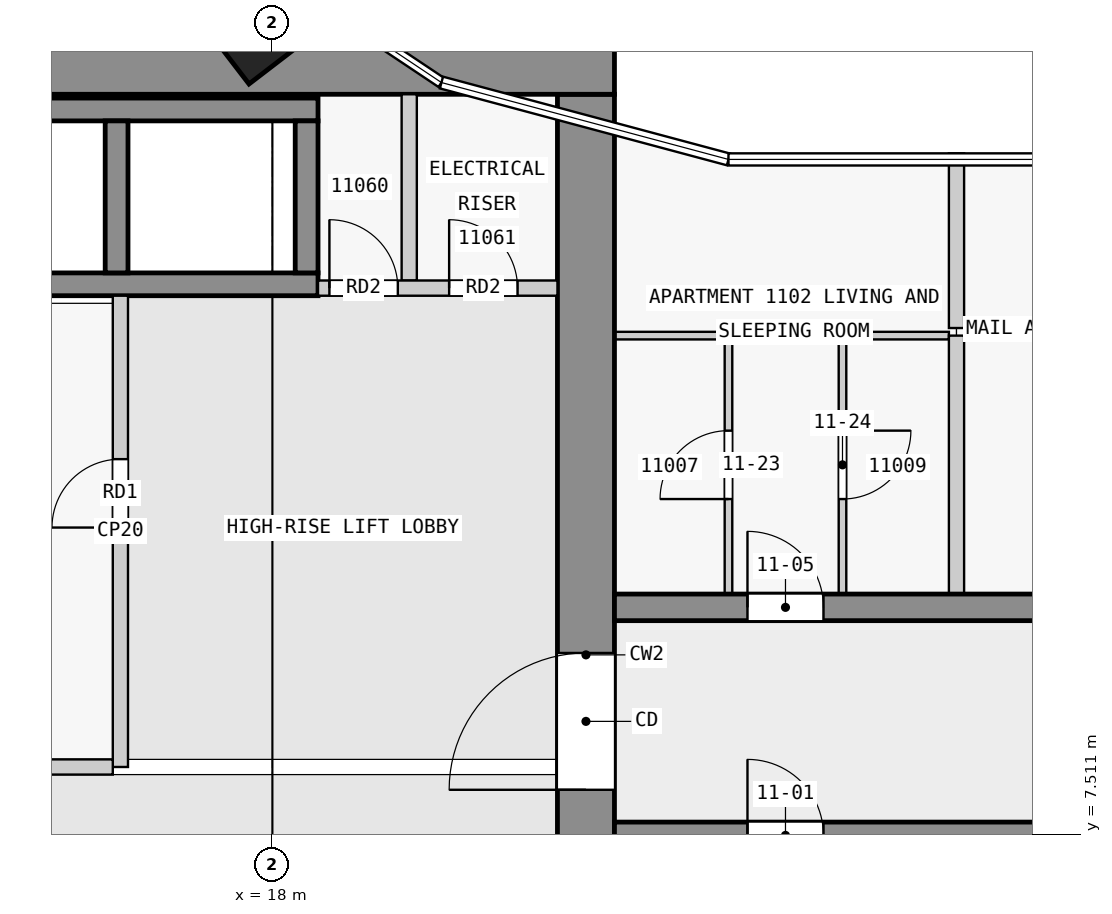
"""IFC4 building model, lengths in metres.
Left out: names, types, materials, properties, quantities, classifications, styles, units other than length and angle.
Written with IfcOpenShell. Run it as: python <this file> out.ifc"""

import sys

from ifc_helpers import new_model, si_unit, direction, frame, frame_2d, origin, origin_2d, place, context, subcontext, project, spatial, rectangle, extrude, element, fill, save


model = new_model("IFC4")
c1 = context("Model", 3, precision=1e-05, world=origin(), true_north=direction((0.0, 1.0)))
c2 = subcontext(c1, "Body", "Model", "MODEL_VIEW")
j1 = project(units=[si_unit("LENGTHUNIT", "METRE"), si_unit("PLANEANGLEUNIT", "RADIAN")], contexts=[c1])
p1 = place(None, origin())
s1 = spatial("IfcSite", under=j1, at=p1, CompositionType="ELEMENT")
p2 = place(p1, origin())
s2 = spatial("IfcBuilding", under=s1, at=p2, CompositionType="ELEMENT")
p3 = place(p2, frame((0.0, 0.0, 47.8)))
s3 = spatial("IfcBuildingStorey", under=s2, at=p3, CompositionType="ELEMENT", Elevation=47.8)
p4 = place(p3, frame((18.065, 18.05, 0.0), z_axis=(0.0, 0.0, 1.0), x_axis=(-0.608810846443, 0.793315418515, 0.0)))
e1 = element("IfcColumn", 1, at=p4, inside=s3, PredefinedType="COLUMN", context=c2, shape_type="SweptSolid", body=[
    extrude(rectangle(XDim=0.6, YDim=1.4, at=origin_2d()), origin(), (0.0, 0.0, 1.0), 3.5),
])
p5 = place(p3, frame((1.55, 17.625, 0.0), z_axis=(0.0, 0.0, 1.0), x_axis=(1.0, 0.0, 0.0)))
e2 = element("IfcWall", 2, at=p5, inside=s3, PredefinedType="SHEAR", context=c2, shape_type="SweptSolid", body=[
    extrude(rectangle(XDim=20.95, YDim=0.75, at=frame_2d((10.475, 0.0))), origin(), (0.0, 0.0, 1.0), 3.25),
])
p6 = place(p5, frame((6.55, 0.0, 0.0)))
e3 = element("IfcOpeningElement", 3, at=p6, cuts=e2, PredefinedType="OPENING", context=c2, shape_type="SweptSolid", body=[
    extrude(rectangle(XDim=1.8, YDim=2.1, at=frame_2d((0.9, 1.05))), frame((0.0, 0.385, 0.0), z_axis=(0.0, -1.0, 0.0), x_axis=(1.0, 0.0, 0.0)), (0.0, 0.0, 1.0), 0.77),
])
p7 = place(p3, frame((22.125, 2.5, 0.0), z_axis=(0.0, 0.0, 1.0), x_axis=(0.0, 1.0, 0.0)))
e4 = element("IfcWall", 4, at=p7, inside=s3, PredefinedType="SHEAR", context=c2, shape_type="SweptSolid", body=[
    extrude(rectangle(XDim=14.75, YDim=0.75, at=frame_2d((7.375, 0.0))), origin(), (0.0, 0.0, 1.0), 3.25),
])
p8 = place(p7, frame((5.6, 0.0, 0.0)))
e5 = element("IfcOpeningElement", 5, at=p8, cuts=e4, PredefinedType="OPENING", context=c2, shape_type="SweptSolid", body=[
    extrude(rectangle(XDim=1.8, YDim=2.1, at=frame_2d((0.9, 1.05))), frame((0.0, 0.385, 0.0), z_axis=(0.0, -1.0, 0.0), x_axis=(1.0, 0.0, 0.0)), (0.0, 0.0, 1.0), 0.77),
])
for number, where, z_axis, x_axis in (
    (6, (10.8, 17.05, 0.0), (0.0, 0.0, 1.0), (1.0, 0.0, 0.0)),
    (7, (10.8, 14.75, 0.0), (0.0, 0.0, 1.0), (1.0, 0.0, 0.0)),
):
    element("IfcWall", number, at=place(p3, frame(where, z_axis=z_axis, x_axis=x_axis)), inside=s3, PredefinedType="SHEAR", context=c2, shape_type="SweptSolid", body=[
        extrude(rectangle(XDim=7.8, YDim=0.3, at=frame_2d((3.9, 0.0))), origin(), (0.0, 0.0, 1.0), 3.25),
    ])
for number, where, z_axis, x_axis in (
    (8, (15.95, 14.9, 0.0), (0.0, 0.0, 1.0), (0.0, 1.0, 0.0)),
    (9, (18.45, 14.9, 0.0), (0.0, 0.0, 1.0), (0.0, 1.0, 0.0)),
):
    element("IfcWall", number, at=place(p3, frame(where, z_axis=z_axis, x_axis=x_axis)), inside=s3, PredefinedType="SHEAR", context=c2, shape_type="SweptSolid", body=[
        extrude(rectangle(XDim=2.0, YDim=0.3, at=frame_2d((1.0, 0.0))), origin(), (0.0, 0.0, 1.0), 3.25),
    ])
p9 = place(p3, frame((22.5, 7.5, 0.0), z_axis=(0.0, 0.0, 1.0), x_axis=(1.0, 0.0, 0.0)))
e10 = element("IfcWall", 10, at=p9, inside=s3, PredefinedType="SHEAR", context=c2, shape_type="SweptSolid", body=[
    extrude(rectangle(XDim=22.5, YDim=0.35, at=frame_2d((11.25, 0.0))), origin(), (0.0, 0.0, 1.0), 3.25),
])
p10 = place(p9, frame((1.75, 0.0, 0.0)))
e11 = element("IfcOpeningElement", 11, at=p10, cuts=e10, PredefinedType="OPENING", context=c2, shape_type="SweptSolid", body=[
    extrude(rectangle(XDim=1.0, YDim=2.1, at=frame_2d((0.5, 1.05))), frame((0.0, 0.185, 0.0), z_axis=(0.0, -1.0, 0.0), x_axis=(1.0, 0.0, 0.0)), (0.0, 0.0, 1.0), 0.37),
])
p11 = place(p9, frame((10.15, 0.0, 0.0)))
e12 = element("IfcOpeningElement", 12, at=p11, cuts=e10, PredefinedType="OPENING", context=c2, shape_type="SweptSolid", body=[
    extrude(rectangle(XDim=1.0, YDim=2.1, at=frame_2d((0.5, 1.05))), frame((0.0, 0.185, 0.0), z_axis=(0.0, -1.0, 0.0), x_axis=(1.0, 0.0, 0.0)), (0.0, 0.0, 1.0), 0.37),
])
p12 = place(p9, frame((18.75, 0.0, 0.0)))
e13 = element("IfcOpeningElement", 13, at=p12, cuts=e10, PredefinedType="OPENING", context=c2, shape_type="SweptSolid", body=[
    extrude(rectangle(XDim=0.9, YDim=2.1, at=frame_2d((0.45, 1.05))), frame((0.0, 0.185, 0.0), z_axis=(0.0, -1.0, 0.0), x_axis=(1.0, 0.0, 0.0)), (0.0, 0.0, 1.0), 0.37),
])
p13 = place(p9, frame((20.95, 0.0, 0.0)))
e14 = element("IfcOpeningElement", 14, at=p13, cuts=e10, PredefinedType="OPENING", context=c2, shape_type="SweptSolid", body=[
    extrude(rectangle(XDim=1.0, YDim=2.1, at=frame_2d((0.5, 1.05))), frame((0.0, 0.185, 0.0), z_axis=(0.0, -1.0, 0.0), x_axis=(1.0, 0.0, 0.0)), (0.0, 0.0, 1.0), 0.37),
])
p14 = place(p3, frame((22.5, 10.5, 0.0), z_axis=(0.0, 0.0, 1.0), x_axis=(1.0, 0.0, 0.0)))
e15 = element("IfcWall", 15, at=p14, inside=s3, PredefinedType="SHEAR", context=c2, shape_type="SweptSolid", body=[
    extrude(rectangle(XDim=22.5, YDim=0.35, at=frame_2d((11.25, 0.0))), origin(), (0.0, 0.0, 1.0), 3.25),
])
p15 = place(p14, frame((1.75, 0.0, 0.0)))
e16 = element("IfcOpeningElement", 16, at=p15, cuts=e15, PredefinedType="OPENING", context=c2, shape_type="SweptSolid", body=[
    extrude(rectangle(XDim=1.0, YDim=2.1, at=frame_2d((0.5, 1.05))), frame((0.0, 0.185, 0.0), z_axis=(0.0, -1.0, 0.0), x_axis=(1.0, 0.0, 0.0)), (0.0, 0.0, 1.0), 0.37),
])
p16 = place(p14, frame((6.25, 0.0, 0.0)))
e17 = element("IfcOpeningElement", 17, at=p16, cuts=e15, PredefinedType="OPENING", context=c2, shape_type="SweptSolid", body=[
    extrude(rectangle(XDim=1.0, YDim=2.1, at=frame_2d((0.5, 1.05))), frame((0.0, 0.185, 0.0), z_axis=(0.0, -1.0, 0.0), x_axis=(1.0, 0.0, 0.0)), (0.0, 0.0, 1.0), 0.37),
])
p17 = place(p14, frame((10.75, 0.0, 0.0)))
e18 = element("IfcOpeningElement", 18, at=p17, cuts=e15, PredefinedType="OPENING", context=c2, shape_type="SweptSolid", body=[
    extrude(rectangle(XDim=1.0, YDim=2.1, at=frame_2d((0.5, 1.05))), frame((0.0, 0.185, 0.0), z_axis=(0.0, -1.0, 0.0), x_axis=(1.0, 0.0, 0.0)), (0.0, 0.0, 1.0), 0.37),
])
p18 = place(p14, frame((16.85, 0.0, 0.0)))
e19 = element("IfcOpeningElement", 19, at=p18, cuts=e15, PredefinedType="OPENING", context=c2, shape_type="SweptSolid", body=[
    extrude(rectangle(XDim=1.0, YDim=2.1, at=frame_2d((0.5, 1.05))), frame((0.0, 0.185, 0.0), z_axis=(0.0, -1.0, 0.0), x_axis=(1.0, 0.0, 0.0)), (0.0, 0.0, 1.0), 0.37),
])
p19 = place(p3, frame((10.9, 8.4, 0.0), z_axis=(0.0, 0.0, 1.0), x_axis=(1.0, 0.0, 0.0)))
e20 = element("IfcWall", 20, at=p19, inside=s3, PredefinedType="PARTITIONING", context=c2, shape_type="SweptSolid", body=[
    extrude(rectangle(XDim=5.0, YDim=0.2, at=frame_2d((2.5, 0.0))), origin(), (0.0, 0.0, 1.0), 3.25),
])
p20 = place(p3, frame((16.0, 8.4, 0.0), z_axis=(0.0, 0.0, 1.0), x_axis=(0.0, 1.0, 0.0)))
e21 = element("IfcWall", 21, at=p20, inside=s3, PredefinedType="PARTITIONING", context=c2, shape_type="SweptSolid", body=[
    extrude(rectangle(XDim=6.2, YDim=0.2, at=frame_2d((3.1, 0.0))), origin(), (0.0, 0.0, 1.0), 3.25),
])
p21 = place(p20, frame((3.15, 0.0, 0.0)))
e22 = element("IfcOpeningElement", 22, at=p21, cuts=e21, PredefinedType="OPENING", context=c2, shape_type="SweptSolid", body=[
    extrude(rectangle(XDim=0.9, YDim=2.1, at=frame_2d((0.45, 1.05))), frame((0.0, 0.11, 0.0), z_axis=(0.0, -1.0, 0.0), x_axis=(1.0, 0.0, 0.0)), (0.0, 0.0, 1.0), 0.22),
])
p22 = place(p3, frame((18.6, 14.7, 0.0), z_axis=(0.0, 0.0, 1.0), x_axis=(1.0, 0.0, 0.0)))
e23 = element("IfcWall", 23, at=p22, inside=s3, PredefinedType="PARTITIONING", context=c2, shape_type="SweptSolid", body=[
    extrude(rectangle(XDim=3.15, YDim=0.2, at=frame_2d((1.575, 0.0))), origin(), (0.0, 0.0, 1.0), 3.25),
])
p23 = place(p22, frame((0.15, 0.0, 0.0)))
e24 = element("IfcOpeningElement", 24, at=p23, cuts=e23, PredefinedType="OPENING", context=c2, shape_type="SweptSolid", body=[
    extrude(rectangle(XDim=0.9, YDim=2.1, at=frame_2d((0.45, 1.05))), frame((0.0, 0.11, 0.0), z_axis=(0.0, -1.0, 0.0), x_axis=(1.0, 0.0, 0.0)), (0.0, 0.0, 1.0), 0.22),
])
p24 = place(p22, frame((1.725, 0.0, 0.0)))
e25 = element("IfcOpeningElement", 25, at=p24, cuts=e23, PredefinedType="OPENING", context=c2, shape_type="SweptSolid", body=[
    extrude(rectangle(XDim=0.9, YDim=2.1, at=frame_2d((0.45, 1.05))), frame((0.0, 0.11, 0.0), z_axis=(0.0, -1.0, 0.0), x_axis=(1.0, 0.0, 0.0)), (0.0, 0.0, 1.0), 0.22),
])
p25 = place(p3, frame((19.8, 14.8, 0.0), z_axis=(0.0, 0.0, 1.0), x_axis=(0.0, 1.0, 0.0)))
e26 = element("IfcWall", 26, at=p25, inside=s3, PredefinedType="PARTITIONING", context=c2, shape_type="SweptSolid", body=[
    extrude(rectangle(XDim=2.45, YDim=0.2, at=frame_2d((1.225, 0.0))), origin(), (0.0, 0.0, 1.0), 3.25),
])
p26 = place(p3, frame((23.95, 14.075, 0.0), z_axis=(0.0, 0.0, 1.0), x_axis=(-1.0, 0.0, 0.0)))
e27 = element("IfcWall", 27, at=p26, inside=s3, PredefinedType="PARTITIONING", context=c2, shape_type="SweptSolid", body=[
    extrude(rectangle(XDim=1.45, YDim=0.1, at=frame_2d((0.725, 0.0))), origin(), (0.0, 0.0, 1.0), 3.25),
])
p27 = place(p3, frame((26.9, 14.075, 0.0), z_axis=(0.0, 0.0, 1.0), x_axis=(-1.0, 0.0, 0.0)))
e28 = element("IfcWall", 28, at=p27, inside=s3, PredefinedType="PARTITIONING", context=c2, shape_type="SweptSolid", body=[
    extrude(rectangle(XDim=1.35, YDim=0.1, at=frame_2d((0.675, 0.0))), origin(), (0.0, 0.0, 1.0), 3.25),
])
p28 = place(p3, frame((24.0, 10.675, 0.0), z_axis=(0.0, 0.0, 1.0), x_axis=(0.0, 1.0, 0.0)))
e29 = element("IfcWall", 29, at=p28, inside=s3, PredefinedType="PARTITIONING", context=c2, shape_type="SweptSolid", body=[
    extrude(rectangle(XDim=3.4, YDim=0.1, at=frame_2d((1.7, 0.0))), origin(), (0.0, 0.0, 1.0), 3.25),
])
p29 = place(p28, frame((1.25, 0.0, 0.0)))
e30 = element("IfcOpeningElement", 30, at=p29, cuts=e29, PredefinedType="OPENING", context=c2, shape_type="SweptSolid", body=[
    extrude(rectangle(XDim=0.9, YDim=2.1, at=frame_2d((0.45, 1.05))), frame((0.0, 0.06, 0.0), z_axis=(0.0, -1.0, 0.0), x_axis=(1.0, 0.0, 0.0)), (0.0, 0.0, 1.0), 0.12),
])
p30 = place(p3, frame((25.5, 14.075, 0.0), z_axis=(0.0, 0.0, 1.0), x_axis=(0.0, -1.0, 0.0)))
e31 = element("IfcWall", 31, at=p30, inside=s3, PredefinedType="PARTITIONING", context=c2, shape_type="SweptSolid", body=[
    extrude(rectangle(XDim=3.4, YDim=0.1, at=frame_2d((1.7, 0.0))), origin(), (0.0, 0.0, 1.0), 3.25),
])
p31 = place(p30, frame((1.25, 0.0, 0.0)))
e32 = element("IfcOpeningElement", 32, at=p31, cuts=e31, PredefinedType="OPENING", context=c2, shape_type="SweptSolid", body=[
    extrude(rectangle(XDim=0.9, YDim=2.1, at=frame_2d((0.45, 1.05))), frame((0.0, 0.06, 0.0), z_axis=(0.0, -1.0, 0.0), x_axis=(1.0, 0.0, 0.0)), (0.0, 0.0, 1.0), 0.12),
])
p32 = place(p3, frame((27.0, 16.473, 0.0), z_axis=(0.0, 0.0, 1.0), x_axis=(0.0, -1.0, 0.0)))
e33 = element("IfcWall", 33, at=p32, inside=s3, PredefinedType="PARTITIONING", context=c2, shape_type="SweptSolid", body=[
    extrude(rectangle(XDim=2.298, YDim=0.2, at=frame_2d((1.149, 0.0))), origin(), (0.0, 0.0, 1.0), 3.25),
])
p33 = place(p3, frame((27.0, 10.675, 0.0), z_axis=(0.0, 0.0, 1.0), x_axis=(0.0, 1.0, 0.0)))
e34 = element("IfcWall", 34, at=p33, inside=s3, PredefinedType="PARTITIONING", context=c2, shape_type="SweptSolid", body=[
    extrude(rectangle(XDim=3.4, YDim=0.2, at=frame_2d((1.7, 0.0))), origin(), (0.0, 0.0, 1.0), 3.25),
])
p34 = place(p21, origin())
e35 = element("IfcDoor", 35, at=p34, inside=s3, OperationType="SINGLE_SWING_LEFT", PredefinedType="DOOR", context=c2, shape_type="SweptSolid", body=[
    extrude(rectangle(XDim=0.9, YDim=2.1, at=frame_2d((0.45, 1.05))), frame((0.0, 0.025, 0.0), z_axis=(0.0, -1.0, 0.0), x_axis=(1.0, 0.0, 0.0)), (0.0, 0.0, 1.0), 0.05),
])
fill(e22, e35)
p35 = place(p8, origin())
e36 = element("IfcDoor", 36, at=p35, inside=s3, OperationType="DOUBLE_DOOR_SINGLE_SWING", PredefinedType="DOOR", context=c2, shape_type="SweptSolid", body=[
    extrude(rectangle(XDim=1.8, YDim=2.1, at=frame_2d((0.9, 1.05))), frame((0.0, 0.025, 0.0), z_axis=(0.0, -1.0, 0.0), x_axis=(1.0, 0.0, 0.0)), (0.0, 0.0, 1.0), 0.05),
])
fill(e5, e36)
p36 = place(p23, origin())
e37 = element("IfcDoor", 37, at=p36, inside=s3, OperationType="SINGLE_SWING_LEFT", PredefinedType="DOOR", context=c2, shape_type="SweptSolid", body=[
    extrude(rectangle(XDim=0.9, YDim=2.1, at=frame_2d((0.45, 1.05))), frame((0.0, 0.025, 0.0), z_axis=(0.0, -1.0, 0.0), x_axis=(1.0, 0.0, 0.0)), (0.0, 0.0, 1.0), 0.05),
])
fill(e24, e37)
p37 = place(p24, origin())
e38 = element("IfcDoor", 38, at=p37, inside=s3, OperationType="SINGLE_SWING_LEFT", PredefinedType="DOOR", context=c2, shape_type="SweptSolid", body=[
    extrude(rectangle(XDim=0.9, YDim=2.1, at=frame_2d((0.45, 1.05))), frame((0.0, 0.025, 0.0), z_axis=(0.0, -1.0, 0.0), x_axis=(1.0, 0.0, 0.0)), (0.0, 0.0, 1.0), 0.05),
])
fill(e25, e38)
p38 = place(p10, origin())
e39 = element("IfcDoor", 39, at=p38, inside=s3, OperationType="SINGLE_SWING_LEFT", PredefinedType="DOOR", context=c2, shape_type="SweptSolid", body=[
    extrude(rectangle(XDim=1.0, YDim=2.1, at=frame_2d((0.5, 1.05))), frame((0.0, 0.025, 0.0), z_axis=(0.0, -1.0, 0.0), x_axis=(1.0, 0.0, 0.0)), (0.0, 0.0, 1.0), 0.05),
])
fill(e11, e39)
p39 = place(p15, origin())
e40 = element("IfcDoor", 40, at=p39, inside=s3, OperationType="SINGLE_SWING_LEFT", PredefinedType="DOOR", context=c2, shape_type="SweptSolid", body=[
    extrude(rectangle(XDim=1.0, YDim=2.1, at=frame_2d((0.5, 1.05))), frame((0.0, 0.025, 0.0), z_axis=(0.0, -1.0, 0.0), x_axis=(1.0, 0.0, 0.0)), (0.0, 0.0, 1.0), 0.05),
])
fill(e16, e40)
p40 = place(p29, origin())
e41 = element("IfcDoor", 41, at=p40, inside=s3, OperationType="SINGLE_SWING_RIGHT", PredefinedType="DOOR", context=c2, shape_type="SweptSolid", body=[
    extrude(rectangle(XDim=0.9, YDim=2.1, at=frame_2d((0.45, 1.05))), frame((0.0, 0.025, 0.0), z_axis=(0.0, -1.0, 0.0), x_axis=(1.0, 0.0, 0.0)), (0.0, 0.0, 1.0), 0.05),
])
fill(e30, e41)
p41 = place(p31, origin())
e42 = element("IfcDoor", 42, at=p41, inside=s3, OperationType="SINGLE_SWING_RIGHT", PredefinedType="DOOR", context=c2, shape_type="SweptSolid", body=[
    extrude(rectangle(XDim=0.9, YDim=2.1, at=frame_2d((0.45, 1.05))), frame((0.0, 0.025, 0.0), z_axis=(0.0, -1.0, 0.0), x_axis=(1.0, 0.0, 0.0)), (0.0, 0.0, 1.0), 0.05),
])
fill(e32, e42)
save(model, sys.argv[1])
